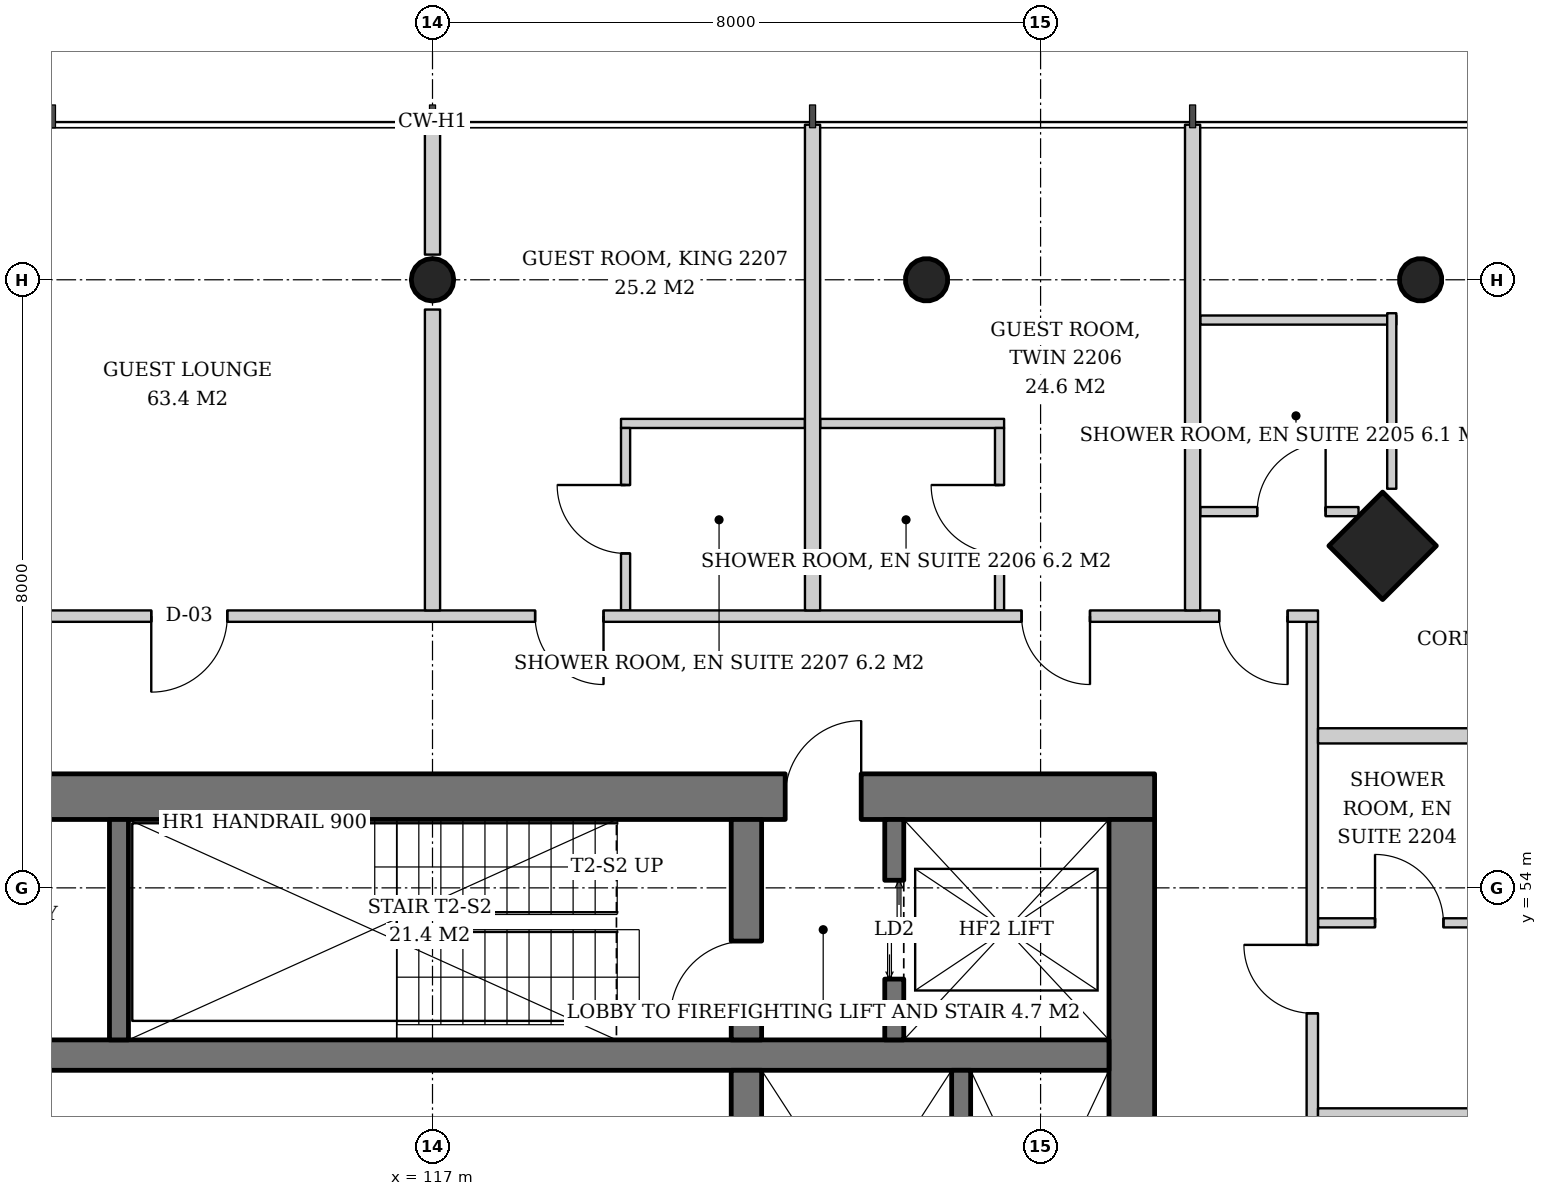
"""IFC4 building model, lengths in metres.
Left out: names, types, materials, properties, quantities, classifications, styles, units other than length and angle.
Written with IfcOpenShell. Run it as: python <this file> out.ifc"""

import sys

from ifc_helpers import new_model, si_unit, direction, frame, frame_2d, origin, origin_2d, place, context, subcontext, project, spatial, rectangle, hollow_circle, extrude, element, fill, save


model = new_model("IFC4")
c1 = context("Model", 3, precision=1e-05, world=origin(), true_north=direction((0.0, 1.0)))
c2 = subcontext(c1, "Body", "Model", "MODEL_VIEW")
j1 = project(units=[si_unit("LENGTHUNIT", "METRE"), si_unit("PLANEANGLEUNIT", "RADIAN")], contexts=[c1])
p1 = place(None, origin())
s1 = spatial("IfcSite", under=j1, at=p1, CompositionType="ELEMENT")
p2 = place(p1, origin())
s2 = spatial("IfcBuilding", under=s1, at=p2, CompositionType="ELEMENT")
p3 = place(p2, frame((0.0, 0.0, 89.4)))
s3 = spatial("IfcBuildingStorey", under=s2, at=p3, CompositionType="ELEMENT", Elevation=89.4)
p4 = place(p3, frame((129.552, 58.552, 0.0), z_axis=(-0.043029647111, -0.043029647111, 0.998146732169), x_axis=(0.707106781187, -0.707106781187, 0.0)))
e1 = element("IfcColumn", 1, at=p4, inside=s3, PredefinedType="COLUMN", context=c2, shape_type="SweptSolid", body=[
    extrude(rectangle(XDim=1.0, YDim=1.0, at=origin_2d()), origin(), (0.0, 0.0, 1.0), 3.807),
])
p5 = place(p3, frame((130.052, 62.052, 0.0), z_axis=(-0.043029647111, -0.043029647111, 0.998146732169), x_axis=(0.707106781187, -0.707106781187, 0.0)))
e2 = element("IfcColumn", 2, at=p5, inside=s3, PredefinedType="COLUMN", context=c2, shape_type="SweptSolid", body=[
    extrude(hollow_circle(Radius=0.28, WallThickness=0.02, at=origin_2d()), origin(), (0.0, 0.0, 1.0), 3.807),
])
p6 = place(p3, frame((123.526, 62.052, 0.0), z_axis=(-0.021561848751, -0.043059525333, 0.998839808957), x_axis=(0.894160516368, -0.44774654769, 0.0)))
e3 = element("IfcColumn", 3, at=p6, inside=s3, PredefinedType="COLUMN", context=c2, shape_type="SweptSolid", body=[
    extrude(hollow_circle(Radius=0.28, WallThickness=0.02, at=origin_2d()), origin(), (0.0, 0.0, 1.0), 3.804),
])
p7 = place(p3, frame((117.0, 62.052, 0.0), z_axis=(0.0, -0.043069538298, 0.999072076915), x_axis=(1.0, 0.0, 0.0)))
e4 = element("IfcColumn", 4, at=p7, inside=s3, PredefinedType="COLUMN", context=c2, shape_type="SweptSolid", body=[
    extrude(hollow_circle(Radius=0.28, WallThickness=0.02, at=origin_2d()), origin(), (0.0, 0.0, 1.0), 3.803),
])
p8 = place(p3, frame((107.5, 55.2, 0.0), z_axis=(0.0, 0.0, 1.0), x_axis=(1.0, 0.0, 0.0)))
e5 = element("IfcWall", 5, at=p8, inside=s3, PredefinedType="SHEAR", context=c2, shape_type="SweptSolid", body=[
    extrude(rectangle(XDim=19.0, YDim=0.6, at=frame_2d((9.5, 0.0))), origin(), (0.0, 0.0, 1.0), 3.8),
])
p9 = place(p8, frame((14.14, 0.0, 0.0)))
e6 = element("IfcOpeningElement", 6, at=p9, cuts=e5, PredefinedType="OPENING", context=c2, shape_type="SweptSolid", body=[
    extrude(rectangle(XDim=1.0, YDim=2.1, at=frame_2d((0.5, 1.05))), frame((0.0, 0.31, 0.0), z_axis=(0.0, -1.0, 0.0), x_axis=(1.0, 0.0, 0.0)), (0.0, 0.0, 1.0), 0.62),
])
p10 = place(p8, frame((2.425, 0.0, 0.0)))
e7 = element("IfcOpeningElement", 7, at=p10, cuts=e5, PredefinedType="OPENING", context=c2, shape_type="SweptSolid", body=[
    extrude(rectangle(XDim=1.0, YDim=2.1, at=frame_2d((0.5, 1.05))), frame((0.0, 0.31, 0.0), z_axis=(0.0, -1.0, 0.0), x_axis=(1.0, 0.0, 0.0)), (0.0, 0.0, 1.0), 0.62),
])
p11 = place(p3, frame((126.2, 37.1, 0.0), z_axis=(0.0, 0.0, 1.0), x_axis=(0.0, 1.0, 0.0)))
e8 = element("IfcWall", 8, at=p11, inside=s3, PredefinedType="SHEAR", context=c2, shape_type="SweptSolid", body=[
    extrude(rectangle(XDim=17.8, YDim=0.6, at=frame_2d((8.9, 0.0))), origin(), (0.0, 0.0, 1.0), 3.8),
])
p12 = place(p11, frame((8.0, 0.0, 0.0)))
e9 = element("IfcOpeningElement", 9, at=p12, cuts=e8, PredefinedType="OPENING", context=c2, shape_type="SweptSolid", body=[
    extrude(rectangle(XDim=1.8, YDim=2.4, at=frame_2d((0.9, 1.2))), frame((0.0, 0.31, 0.0), z_axis=(0.0, -1.0, 0.0), x_axis=(1.0, 0.0, 0.0)), (0.0, 0.0, 1.0), 0.62),
])
p13 = place(p3, frame((108.1, 51.8, 0.0), z_axis=(0.0, 0.0, 1.0), x_axis=(1.0, 0.0, 0.0)))
e10 = element("IfcWall", 10, at=p13, inside=s3, PredefinedType="SHEAR", context=c2, shape_type="SweptSolid", body=[
    extrude(rectangle(XDim=17.8, YDim=0.4, at=frame_2d((8.9, 0.0))), origin(), (0.0, 0.0, 1.0), 3.8),
])
p14 = place(p3, frame((121.13, 40.4, 0.0), z_axis=(0.0, 0.0, 1.0), x_axis=(0.0, 1.0, 0.0)))
e11 = element("IfcWall", 11, at=p14, inside=s3, PredefinedType="SHEAR", context=c2, shape_type="SweptSolid", body=[
    extrude(rectangle(XDim=11.2, YDim=0.4, at=frame_2d((5.6, 0.0))), origin(), (0.0, 0.0, 1.0), 3.8),
])
p15 = place(p3, frame((121.13, 52.0, 0.0), z_axis=(0.0, 0.0, 1.0), x_axis=(0.0, 1.0, 0.0)))
e12 = element("IfcWall", 12, at=p15, inside=s3, PredefinedType="SHEAR", context=c2, shape_type="SweptSolid", body=[
    extrude(rectangle(XDim=2.9, YDim=0.4, at=frame_2d((1.45, 0.0))), origin(), (0.0, 0.0, 1.0), 3.8),
])
p16 = place(p15, frame((0.3, 0.0, 0.0)))
e13 = element("IfcOpeningElement", 13, at=p16, cuts=e12, PredefinedType="OPENING", context=c2, shape_type="SweptSolid", body=[
    extrude(rectangle(XDim=1.0, YDim=2.1, at=frame_2d((0.5, 1.05))), frame((0.0, 0.21, 0.0), z_axis=(0.0, -1.0, 0.0), x_axis=(1.0, 0.0, 0.0)), (0.0, 0.0, 1.0), 0.42),
])
p17 = place(p3, frame((112.875, 52.0, 0.0), z_axis=(0.0, 0.0, 1.0), x_axis=(0.0, 1.0, 0.0)))
e14 = element("IfcWall", 14, at=p17, inside=s3, PredefinedType="SHEAR", context=c2, shape_type="SweptSolid", body=[
    extrude(rectangle(XDim=2.9, YDim=0.25, at=frame_2d((1.45, 0.0))), origin(), (0.0, 0.0, 1.0), 3.8),
])
p18 = place(p3, frame((123.075, 52.0, 0.0), z_axis=(0.0, 0.0, 1.0), x_axis=(0.0, 1.0, 0.0)))
e15 = element("IfcWall", 15, at=p18, inside=s3, PredefinedType="SHEAR", context=c2, shape_type="SweptSolid", body=[
    extrude(rectangle(XDim=2.9, YDim=0.25, at=frame_2d((1.45, 0.0))), origin(), (0.0, 0.0, 1.0), 3.8),
])
p19 = place(p18, frame((0.8, 0.0, 0.0)))
e16 = element("IfcOpeningElement", 16, at=p19, cuts=e15, PredefinedType="OPENING", context=c2, shape_type="SweptSolid", body=[
    extrude(rectangle(XDim=1.3, YDim=2.2, at=frame_2d((0.65, 1.1))), frame((0.0, 0.135, 0.0), z_axis=(0.0, -1.0, 0.0), x_axis=(1.0, 0.0, 0.0)), (0.0, 0.0, 1.0), 0.27),
])
p20 = place(p3, frame((123.955, 47.75, 0.0), z_axis=(0.0, 0.0, 1.0), x_axis=(0.0, 1.0, 0.0)))
e17 = element("IfcWall", 17, at=p20, inside=s3, PredefinedType="SHEAR", context=c2, shape_type="SweptSolid", body=[
    extrude(rectangle(XDim=3.85, YDim=0.25, at=frame_2d((1.925, 0.0))), origin(), (0.0, 0.0, 1.0), 3.8),
])
p21 = place(p3, frame((128.65, 53.54, 0.0), z_axis=(0.0, 0.0, 1.0), x_axis=(1.0, 0.0, 0.0)))
e18 = element("IfcWall", 18, at=p21, inside=s3, PredefinedType="PARTITIONING", context=c2, shape_type="SweptSolid", body=[
    extrude(rectangle(XDim=2.4, YDim=0.12, at=frame_2d((1.2, 0.0))), origin(), (0.0, 0.0, 1.0), 3.0),
])
p22 = place(p21, frame((0.75, 0.0, 0.0)))
e19 = element("IfcOpeningElement", 19, at=p22, cuts=e18, PredefinedType="OPENING", context=c2, shape_type="SweptSolid", body=[
    extrude(rectangle(XDim=0.9, YDim=2.1, at=frame_2d((0.45, 1.05))), frame((0.0, 0.07, 0.0), z_axis=(0.0, -1.0, 0.0), x_axis=(1.0, 0.0, 0.0)), (0.0, 0.0, 1.0), 0.14),
])
p23 = place(p3, frame((128.575, 34.35, 0.0), z_axis=(0.0, 0.0, 1.0), x_axis=(0.0, 1.0, 0.0)))
e20 = element("IfcWall", 20, at=p23, inside=s3, PredefinedType="PARTITIONING", context=c2, shape_type="SweptSolid", body=[
    extrude(rectangle(XDim=23.15, YDim=0.15, at=frame_2d((11.575, 0.0))), origin(), (0.0, 0.0, 1.0), 2.9),
])
p24 = place(p23, frame((0.4, 0.0, 0.0)))
e21 = element("IfcOpeningElement", 21, at=p24, cuts=e20, PredefinedType="OPENING", context=c2, shape_type="SweptSolid", body=[
    extrude(rectangle(XDim=0.9, YDim=2.1, at=frame_2d((0.45, 1.05))), frame((0.0, 0.085, 0.0), z_axis=(0.0, -1.0, 0.0), x_axis=(1.0, 0.0, 0.0)), (0.0, 0.0, 1.0), 0.17),
])
p25 = place(p23, frame((8.0, 0.0, 0.0)))
e22 = element("IfcOpeningElement", 22, at=p25, cuts=e20, PredefinedType="OPENING", context=c2, shape_type="SweptSolid", body=[
    extrude(rectangle(XDim=0.9, YDim=2.1, at=frame_2d((0.45, 1.05))), frame((0.0, 0.085, 0.0), z_axis=(0.0, -1.0, 0.0), x_axis=(1.0, 0.0, 0.0)), (0.0, 0.0, 1.0), 0.17),
])
p26 = place(p23, frame((14.4, 0.0, 0.0)))
e23 = element("IfcOpeningElement", 23, at=p26, cuts=e20, PredefinedType="OPENING", context=c2, shape_type="SweptSolid", body=[
    extrude(rectangle(XDim=0.9, YDim=2.1, at=frame_2d((0.45, 1.05))), frame((0.0, 0.085, 0.0), z_axis=(0.0, -1.0, 0.0), x_axis=(1.0, 0.0, 0.0)), (0.0, 0.0, 1.0), 0.17),
])
p27 = place(p23, frame((18.0, 0.0, 0.0)))
e24 = element("IfcOpeningElement", 24, at=p27, cuts=e20, PredefinedType="OPENING", context=c2, shape_type="SweptSolid", body=[
    extrude(rectangle(XDim=0.9, YDim=2.1, at=frame_2d((0.45, 1.05))), frame((0.0, 0.085, 0.0), z_axis=(0.0, -1.0, 0.0), x_axis=(1.0, 0.0, 0.0)), (0.0, 0.0, 1.0), 0.17),
])
for number, where, z_axis, x_axis in (
    (25, (128.65, 51.0, 0.0), (0.0, 0.0, 1.0), (1.0, 0.0, 0.0)),
    (26, (128.65, 56.0, 0.0), (0.0, 0.0, 1.0), (1.0, 0.0, 0.0)),
):
    element("IfcWall", number, at=place(p3, frame(where, z_axis=z_axis, x_axis=x_axis)), inside=s3, PredefinedType="PARTITIONING", context=c2, shape_type="SweptSolid", body=[
        extrude(rectangle(XDim=6.39, YDim=0.2, at=frame_2d((3.195, 0.0))), origin(), (0.0, 0.0, 1.0), 3.2),
    ])
p28 = place(p3, frame((127.1, 58.95, 0.0), z_axis=(0.0, 0.0, 1.0), x_axis=(1.0, 0.0, 0.0)))
e27 = element("IfcWall", 27, at=p28, inside=s3, PredefinedType="PARTITIONING", context=c2, shape_type="SweptSolid", body=[
    extrude(rectangle(XDim=2.083, YDim=0.12, at=frame_2d((1.042, 0.0))), origin(), (0.0, 0.0, 1.0), 3.6),
])
p29 = place(p28, frame((0.75, 0.0, 0.0)))
e28 = element("IfcOpeningElement", 28, at=p29, cuts=e27, PredefinedType="OPENING", context=c2, shape_type="SweptSolid", body=[
    extrude(rectangle(XDim=0.9, YDim=2.1, at=frame_2d((0.45, 1.05))), frame((0.0, 0.07, 0.0), z_axis=(0.0, -1.0, 0.0), x_axis=(1.0, 0.0, 0.0)), (0.0, 0.0, 1.0), 0.14),
])
p30 = place(p3, frame((127.1, 61.47, 0.0), z_axis=(0.0, 0.0, 1.0), x_axis=(1.0, 0.0, 0.0)))
e29 = element("IfcWall", 29, at=p30, inside=s3, PredefinedType="PARTITIONING", context=c2, shape_type="SweptSolid", body=[
    extrude(rectangle(XDim=2.58, YDim=0.12, at=frame_2d((1.29, 0.0))), origin(), (0.0, 0.0, 1.0), 3.2),
])
p31 = place(p3, frame((129.62, 59.25, 0.0), z_axis=(0.0, 0.0, 1.0), x_axis=(0.0, 1.0, 0.0)))
e30 = element("IfcWall", 30, at=p31, inside=s3, PredefinedType="PARTITIONING", context=c2, shape_type="SweptSolid", body=[
    extrude(rectangle(XDim=2.31, YDim=0.12, at=frame_2d((1.155, 0.0))), origin(), (0.0, 0.0, 1.0), 3.2),
])
p32 = place(p3, frame((124.52, 60.11, 0.0), z_axis=(0.0, 0.0, 1.0), x_axis=(-1.0, 0.0, 0.0)))
e31 = element("IfcWall", 31, at=p32, inside=s3, PredefinedType="PARTITIONING", context=c2, shape_type="SweptSolid", body=[
    extrude(rectangle(XDim=2.42, YDim=0.12, at=frame_2d((1.21, 0.0))), origin(), (0.0, 0.0, 1.0), 3.0),
])
p33 = place(p3, frame((124.46, 57.65, 0.0), z_axis=(0.0, 0.0, 1.0), x_axis=(0.0, 1.0, 0.0)))
e32 = element("IfcWall", 32, at=p33, inside=s3, PredefinedType="PARTITIONING", context=c2, shape_type="SweptSolid", body=[
    extrude(rectangle(XDim=2.4, YDim=0.12, at=frame_2d((1.2, 0.0))), origin(), (0.0, 0.0, 1.0), 3.6),
])
p34 = place(p33, frame((0.75, 0.0, 0.0)))
e33 = element("IfcOpeningElement", 33, at=p34, cuts=e32, PredefinedType="OPENING", context=c2, shape_type="SweptSolid", body=[
    extrude(rectangle(XDim=0.9, YDim=2.1, at=frame_2d((0.45, 1.05))), frame((0.0, 0.07, 0.0), z_axis=(0.0, -1.0, 0.0), x_axis=(1.0, 0.0, 0.0)), (0.0, 0.0, 1.0), 0.14),
])
p35 = place(p3, frame((121.9, 60.11, 0.0), z_axis=(0.0, 0.0, 1.0), x_axis=(-1.0, 0.0, 0.0)))
e34 = element("IfcWall", 34, at=p35, inside=s3, PredefinedType="PARTITIONING", context=c2, shape_type="SweptSolid", body=[
    extrude(rectangle(XDim=2.42, YDim=0.12, at=frame_2d((1.21, 0.0))), origin(), (0.0, 0.0, 1.0), 3.6),
])
p36 = place(p3, frame((119.54, 57.65, 0.0), z_axis=(0.0, 0.0, 1.0), x_axis=(0.0, 1.0, 0.0)))
e35 = element("IfcWall", 35, at=p36, inside=s3, PredefinedType="PARTITIONING", context=c2, shape_type="SweptSolid", body=[
    extrude(rectangle(XDim=2.4, YDim=0.12, at=frame_2d((1.2, 0.0))), origin(), (0.0, 0.0, 1.0), 3.6),
])
p37 = place(p36, frame((0.75, 0.0, 0.0)))
e36 = element("IfcOpeningElement", 36, at=p37, cuts=e35, PredefinedType="OPENING", context=c2, shape_type="SweptSolid", body=[
    extrude(rectangle(XDim=0.9, YDim=2.1, at=frame_2d((0.45, 1.05))), frame((0.0, 0.07, 0.0), z_axis=(0.0, -1.0, 0.0), x_axis=(1.0, 0.0, 0.0)), (0.0, 0.0, 1.0), 0.14),
])
p38 = place(p3, frame((128.65, 57.575, 0.0), z_axis=(0.0, 0.0, 1.0), x_axis=(-1.0, 0.0, 0.0)))
e37 = element("IfcWall", 37, at=p38, inside=s3, PredefinedType="PARTITIONING", context=c2, shape_type="SweptSolid", body=[
    extrude(rectangle(XDim=23.15, YDim=0.15, at=frame_2d((11.575, 0.0))), origin(), (0.0, 0.0, 1.0), 2.9),
])
p39 = place(p38, frame((0.4, 0.0, 0.0)))
e38 = element("IfcOpeningElement", 38, at=p39, cuts=e37, PredefinedType="OPENING", context=c2, shape_type="SweptSolid", body=[
    extrude(rectangle(XDim=0.9, YDim=2.1, at=frame_2d((0.45, 1.05))), frame((0.0, 0.085, 0.0), z_axis=(0.0, -1.0, 0.0), x_axis=(1.0, 0.0, 0.0)), (0.0, 0.0, 1.0), 0.17),
])
p40 = place(p38, frame((3.0, 0.0, 0.0)))
e39 = element("IfcOpeningElement", 39, at=p40, cuts=e37, PredefinedType="OPENING", context=c2, shape_type="SweptSolid", body=[
    extrude(rectangle(XDim=0.9, YDim=2.1, at=frame_2d((0.45, 1.05))), frame((0.0, 0.085, 0.0), z_axis=(0.0, -1.0, 0.0), x_axis=(1.0, 0.0, 0.0)), (0.0, 0.0, 1.0), 0.17),
])
p41 = place(p38, frame((9.4, 0.0, 0.0)))
e40 = element("IfcOpeningElement", 40, at=p41, cuts=e37, PredefinedType="OPENING", context=c2, shape_type="SweptSolid", body=[
    extrude(rectangle(XDim=0.9, YDim=2.1, at=frame_2d((0.45, 1.05))), frame((0.0, 0.085, 0.0), z_axis=(0.0, -1.0, 0.0), x_axis=(1.0, 0.0, 0.0)), (0.0, 0.0, 1.0), 0.17),
])
p42 = place(p38, frame((14.35, 0.0, 0.0)))
e41 = element("IfcOpeningElement", 41, at=p42, cuts=e37, PredefinedType="OPENING", context=c2, shape_type="SweptSolid", body=[
    extrude(rectangle(XDim=1.0, YDim=2.1, at=frame_2d((0.5, 1.05))), frame((0.0, 0.085, 0.0), z_axis=(0.0, -1.0, 0.0), x_axis=(1.0, 0.0, 0.0)), (0.0, 0.0, 1.0), 0.17),
])
p43 = place(p3, frame((127.0, 57.65, 0.0), z_axis=(0.0, 0.0, 1.0), x_axis=(0.0, 1.0, 0.0)))
e42 = element("IfcWall", 42, at=p43, inside=s3, PredefinedType="PARTITIONING", context=c2, shape_type="SweptSolid", body=[
    extrude(rectangle(XDim=6.39, YDim=0.2, at=frame_2d((3.195, 0.0))), origin(), (0.0, 0.0, 1.0), 3.2),
])
p44 = place(p3, frame((122.0, 57.65, 0.0), z_axis=(0.0, 0.0, 1.0), x_axis=(0.0, 1.0, 0.0)))
e43 = element("IfcWall", 43, at=p44, inside=s3, PredefinedType="PARTITIONING", context=c2, shape_type="SweptSolid", body=[
    extrude(rectangle(XDim=6.39, YDim=0.2, at=frame_2d((3.195, 0.0))), origin(), (0.0, 0.0, 1.0), 3.0),
])
p45 = place(p3, frame((117.0, 57.65, 0.0), z_axis=(0.0, 0.0, 1.0), x_axis=(0.0, 1.0, 0.0)))
e44 = element("IfcWall", 44, at=p45, inside=s3, PredefinedType="PARTITIONING", context=c2, shape_type="SweptSolid", body=[
    extrude(rectangle(XDim=3.958, YDim=0.2, at=frame_2d((1.979, 0.0))), origin(), (0.0, 0.0, 1.0), 3.6),
])
p46 = place(p3, frame((117.0, 62.331, 0.0), z_axis=(0.0, 0.0, 1.0), x_axis=(0.0, 1.0, 0.0)))
e45 = element("IfcWall", 45, at=p46, inside=s3, PredefinedType="PARTITIONING", context=c2, shape_type="SweptSolid", body=[
    extrude(rectangle(XDim=1.709, YDim=0.2, at=frame_2d((0.854, 0.0))), origin(), (0.0, 0.0, 1.0), 3.6),
])
p47 = place(p19, origin())
e46 = element("IfcDoor", 46, at=p47, inside=s3, OperationType="DOUBLE_DOOR_SLIDING", PredefinedType="DOOR", context=c2, shape_type="SweptSolid", body=[
    extrude(rectangle(XDim=1.3, YDim=2.2, at=frame_2d((0.65, 1.1))), frame((0.0, 0.025, 0.0), z_axis=(0.0, -1.0, 0.0), x_axis=(1.0, 0.0, 0.0)), (0.0, 0.0, 1.0), 0.05),
])
fill(e16, e46)
p48 = place(p16, origin())
e47 = element("IfcDoor", 47, at=p48, inside=s3, OperationType="SINGLE_SWING_LEFT", PredefinedType="DOOR", context=c2, shape_type="SweptSolid", body=[
    extrude(rectangle(XDim=1.0, YDim=2.1, at=frame_2d((0.5, 1.05))), frame((0.0, 0.025, 0.0), z_axis=(0.0, -1.0, 0.0), x_axis=(1.0, 0.0, 0.0)), (0.0, 0.0, 1.0), 0.05),
])
fill(e13, e47)
p49 = place(p9, origin())
e48 = element("IfcDoor", 48, at=p49, inside=s3, OperationType="SINGLE_SWING_RIGHT", PredefinedType="DOOR", context=c2, shape_type="SweptSolid", body=[
    extrude(rectangle(XDim=1.0, YDim=2.1, at=frame_2d((0.5, 1.05))), frame((0.0, 0.025, 0.0), z_axis=(0.0, -1.0, 0.0), x_axis=(1.0, 0.0, 0.0)), (0.0, 0.0, 1.0), 0.05),
])
fill(e6, e48)
p50 = place(p22, origin())
e49 = element("IfcDoor", 49, at=p50, inside=s3, OperationType="SINGLE_SWING_LEFT", PredefinedType="DOOR", context=c2, shape_type="SweptSolid", body=[
    extrude(rectangle(XDim=0.9, YDim=2.1, at=frame_2d((0.45, 1.05))), frame((0.0, 0.025, 0.0), z_axis=(0.0, -1.0, 0.0), x_axis=(1.0, 0.0, 0.0)), (0.0, 0.0, 1.0), 0.05),
])
fill(e19, e49)
p51 = place(p27, origin())
e50 = element("IfcDoor", 50, at=p51, inside=s3, OperationType="SINGLE_SWING_RIGHT", PredefinedType="DOOR", context=c2, shape_type="SweptSolid", body=[
    extrude(rectangle(XDim=0.9, YDim=2.1, at=frame_2d((0.45, 1.05))), frame((0.0, 0.025, 0.0), z_axis=(0.0, -1.0, 0.0), x_axis=(1.0, 0.0, 0.0)), (0.0, 0.0, 1.0), 0.05),
])
fill(e24, e50)
p52 = place(p29, origin())
e51 = element("IfcDoor", 51, at=p52, inside=s3, OperationType="SINGLE_SWING_RIGHT", PredefinedType="DOOR", context=c2, shape_type="SweptSolid", body=[
    extrude(rectangle(XDim=0.9, YDim=2.1, at=frame_2d((0.45, 1.05))), frame((0.0, 0.025, 0.0), z_axis=(0.0, -1.0, 0.0), x_axis=(1.0, 0.0, 0.0)), (0.0, 0.0, 1.0), 0.05),
])
fill(e28, e51)
p53 = place(p34, origin())
e52 = element("IfcDoor", 52, at=p53, inside=s3, OperationType="SINGLE_SWING_RIGHT", PredefinedType="DOOR", context=c2, shape_type="SweptSolid", body=[
    extrude(rectangle(XDim=0.9, YDim=2.1, at=frame_2d((0.45, 1.05))), frame((0.0, 0.025, 0.0), z_axis=(0.0, -1.0, 0.0), x_axis=(1.0, 0.0, 0.0)), (0.0, 0.0, 1.0), 0.05),
])
fill(e33, e52)
p54 = place(p37, origin())
e53 = element("IfcDoor", 53, at=p54, inside=s3, OperationType="SINGLE_SWING_RIGHT", PredefinedType="DOOR", context=c2, shape_type="SweptSolid", body=[
    extrude(rectangle(XDim=0.9, YDim=2.1, at=frame_2d((0.45, 1.05))), frame((0.0, 0.025, 0.0), z_axis=(0.0, -1.0, 0.0), x_axis=(1.0, 0.0, 0.0)), (0.0, 0.0, 1.0), 0.05),
])
fill(e36, e53)
p55 = place(p39, origin())
e54 = element("IfcDoor", 54, at=p55, inside=s3, OperationType="SINGLE_SWING_LEFT", PredefinedType="DOOR", context=c2, shape_type="SweptSolid", body=[
    extrude(rectangle(XDim=0.9, YDim=2.1, at=frame_2d((0.45, 1.05))), frame((0.0, 0.025, 0.0), z_axis=(0.0, -1.0, 0.0), x_axis=(1.0, 0.0, 0.0)), (0.0, 0.0, 1.0), 0.05),
])
fill(e38, e54)
p56 = place(p40, origin())
e55 = element("IfcDoor", 55, at=p56, inside=s3, OperationType="SINGLE_SWING_LEFT", PredefinedType="DOOR", context=c2, shape_type="SweptSolid", body=[
    extrude(rectangle(XDim=0.9, YDim=2.1, at=frame_2d((0.45, 1.05))), frame((0.0, 0.025, 0.0), z_axis=(0.0, -1.0, 0.0), x_axis=(1.0, 0.0, 0.0)), (0.0, 0.0, 1.0), 0.05),
])
fill(e39, e55)
p57 = place(p41, origin())
e56 = element("IfcDoor", 56, at=p57, inside=s3, OperationType="SINGLE_SWING_LEFT", PredefinedType="DOOR", context=c2, shape_type="SweptSolid", body=[
    extrude(rectangle(XDim=0.9, YDim=2.1, at=frame_2d((0.45, 1.05))), frame((0.0, 0.025, 0.0), z_axis=(0.0, -1.0, 0.0), x_axis=(1.0, 0.0, 0.0)), (0.0, 0.0, 1.0), 0.05),
])
fill(e40, e56)
p58 = place(p42, origin())
e57 = element("IfcDoor", 57, at=p58, inside=s3, OperationType="SINGLE_SWING_RIGHT", PredefinedType="DOOR", context=c2, shape_type="SweptSolid", body=[
    extrude(rectangle(XDim=1.0, YDim=2.1, at=frame_2d((0.5, 1.05))), frame((0.0, 0.025, 0.0), z_axis=(0.0, -1.0, 0.0), x_axis=(1.0, 0.0, 0.0)), (0.0, 0.0, 1.0), 0.05),
])
fill(e41, e57)
save(model, sys.argv[1])
